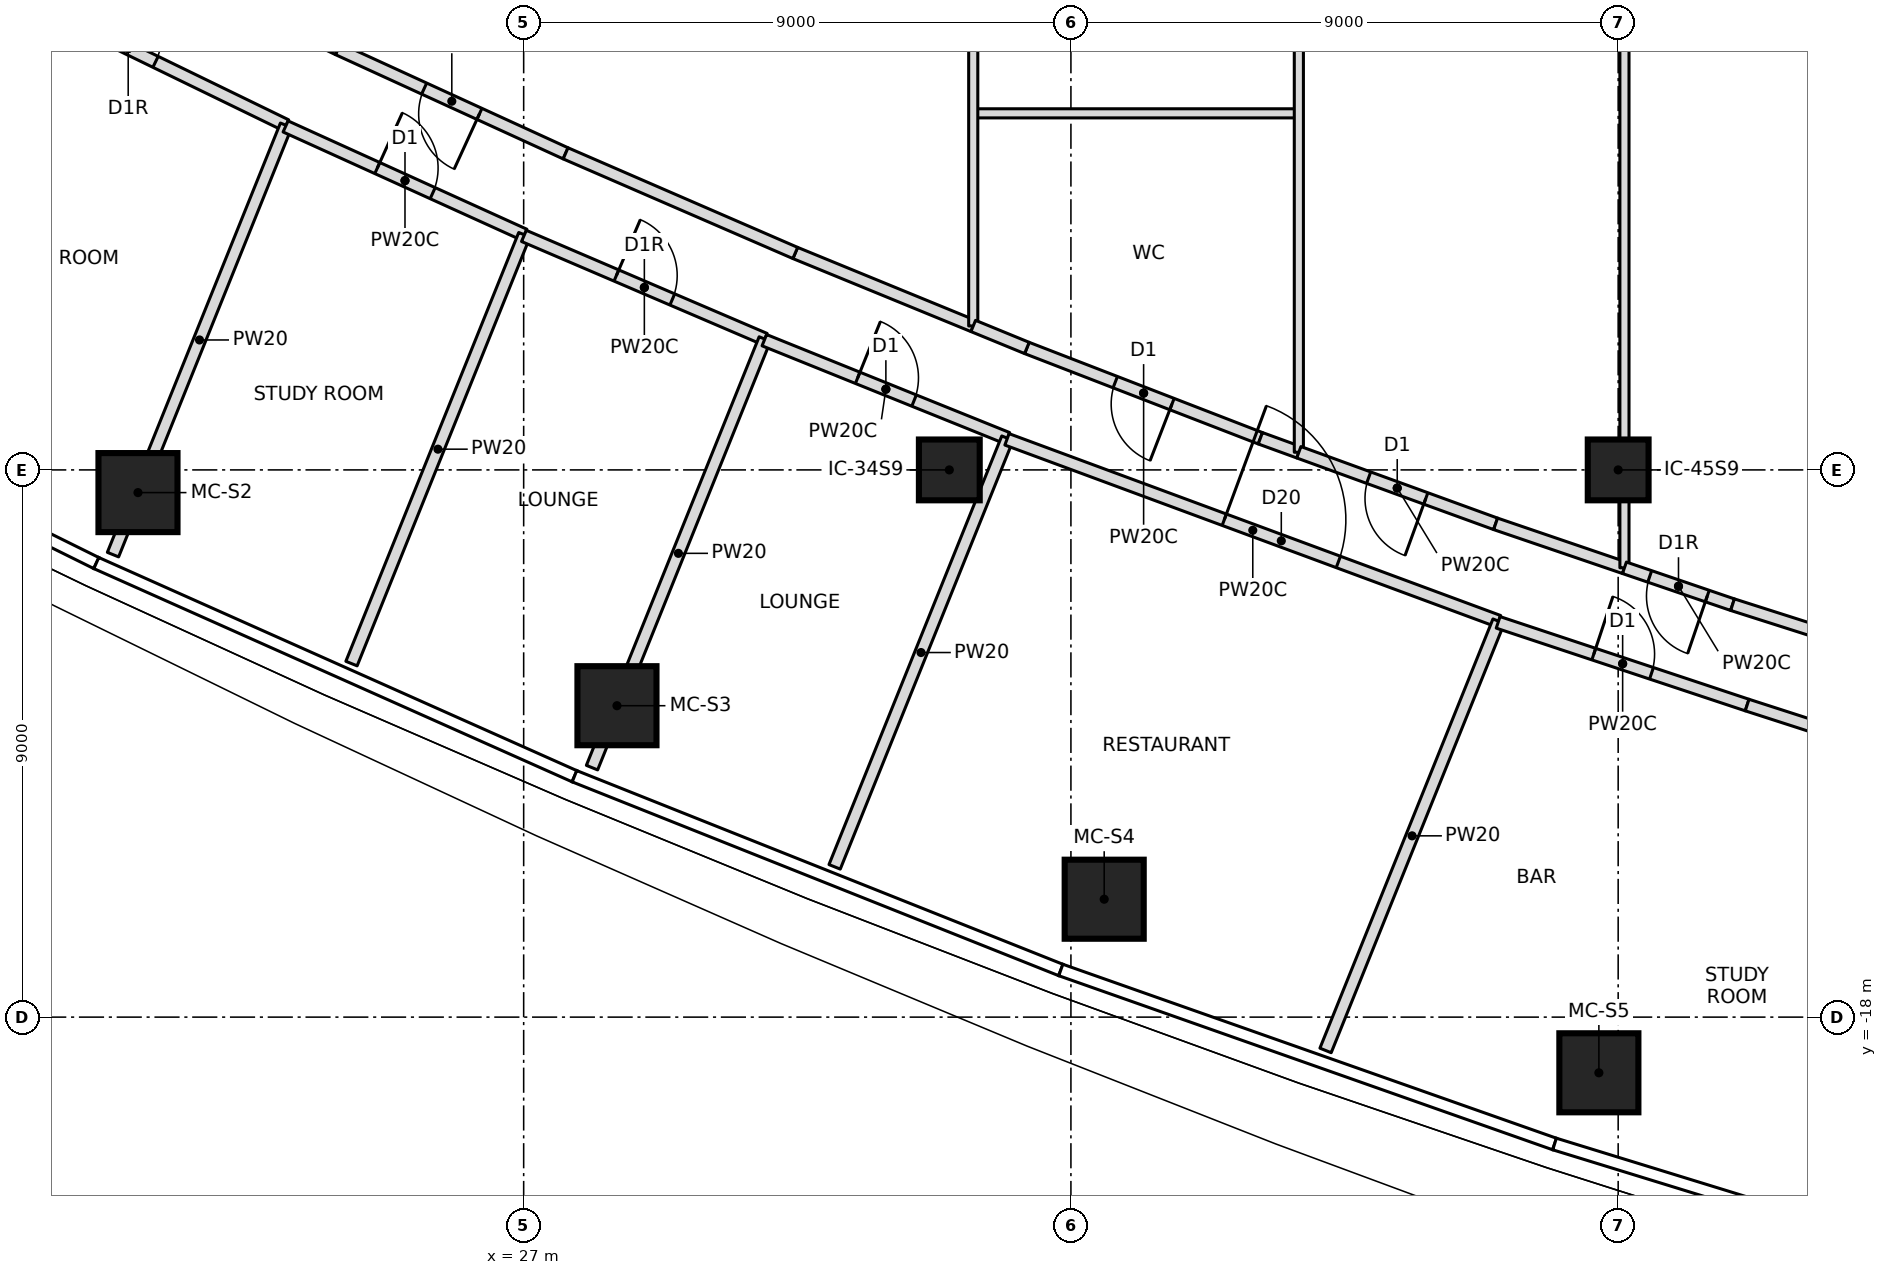
"""IFC4 building model, lengths in metres.
Left out: names, types, materials, properties, quantities, classifications, styles, units other than length and angle.
Written with IfcOpenShell. Run it as: python <this file> out.ifc"""

import sys

from ifc_helpers import new_model, si_unit, direction, frame, frame_2d, origin, origin_2d, place, context, subcontext, project, spatial, rectangle, extrude, element, fill, save


model = new_model("IFC4")
c1 = context("Model", 3, precision=1e-05, world=origin(), true_north=direction((0.0, 1.0)))
c2 = subcontext(c1, "Body", "Model", "MODEL_VIEW")
j1 = project(units=[si_unit("LENGTHUNIT", "METRE"), si_unit("PLANEANGLEUNIT", "RADIAN")], contexts=[c1])
p1 = place(None, origin())
s1 = spatial("IfcSite", under=j1, at=p1, CompositionType="ELEMENT")
p2 = place(p1, origin())
s2 = spatial("IfcBuilding", under=s1, at=p2, CompositionType="ELEMENT")
p3 = place(p2, frame((0.0, 0.0, 170.9)))
s3 = spatial("IfcBuildingStorey", under=s2, at=p3, CompositionType="ELEMENT", Elevation=170.9)
for number, where, z_axis, x_axis in (
    (1, (20.657, -9.373, 0.0), (0.0, 0.0, 1.0), (1.0, 0.0, 0.0)),
    (2, (28.534, -12.878, 0.0), (0.0, 0.0, 1.0), (1.0, 0.0, 0.0)),
    (3, (36.547, -16.061, 0.0), (0.0, 0.0, 1.0), (1.0, 0.0, 0.0)),
    (4, (44.683, -18.916, 0.0), (0.0, 0.0, 1.0), (1.0, 0.0, 0.0)),
):
    element("IfcColumn", number, at=place(p3, frame(where, z_axis=z_axis, x_axis=x_axis)), inside=s3, PredefinedType="COLUMN", context=c2, shape_type="SweptSolid", body=[
        extrude(rectangle(XDim=1.3, YDim=1.3, at=origin_2d()), origin(), (0.0, 0.0, 1.0), 4.6),
    ])
for number, where, z_axis, x_axis in (
    (5, (34.0, -9.0, 0.0), (0.0, 0.0, 1.0), (1.0, 0.0, 0.0)),
    (6, (45.0, -9.0, 0.0), (0.0, 0.0, 1.0), (1.0, 0.0, 0.0)),
):
    element("IfcColumn", number, at=place(p3, frame(where, z_axis=z_axis, x_axis=x_axis)), inside=s3, PredefinedType="COLUMN", context=c2, shape_type="SweptSolid", body=[
        extrude(rectangle(XDim=1.0, YDim=1.0, at=origin_2d()), origin(), (0.0, 0.0, 1.0), 4.6),
    ])
p4 = place(p3, frame((17.9, -0.807, 0.0), z_axis=(0.0, 0.0, 1.0), x_axis=(0.899278241665, -0.437377004503, 0.0)))
e7 = element("IfcWall", 7, at=p4, inside=s3, PredefinedType="PARTITIONING", context=c2, shape_type="SweptSolid", body=[
    extrude(rectangle(XDim=5.774, YDim=0.2, at=frame_2d((2.887, 0.0))), origin(), (0.0, 0.0, 1.0), 4.3),
])
p5 = place(p4, frame((2.387, 0.0, 0.0)))
e8 = element("IfcOpeningElement", 8, at=p5, cuts=e7, PredefinedType="OPENING", context=c2, shape_type="SweptSolid", body=[
    extrude(rectangle(XDim=1.0, YDim=2.1, at=frame_2d((0.5, 1.05))), frame((0.0, 0.11, 0.0), z_axis=(0.0, -1.0, 0.0), x_axis=(1.0, 0.0, 0.0)), (0.0, 0.0, 1.0), 0.22),
])
p6 = place(p3, frame((20.246, -10.393, 0.0), z_axis=(0.0, 0.0, 1.0), x_axis=(0.373894034942, 0.927471428473, 0.0)))
e9 = element("IfcWall", 9, at=p6, inside=s3, PredefinedType="PARTITIONING", context=c2, shape_type="SweptSolid", body=[
    extrude(rectangle(XDim=7.613, YDim=0.2, at=frame_2d((3.807, 0.0))), origin(), (0.0, 0.0, 1.0), 4.3),
])
p7 = place(p3, frame((23.085, -3.351, 0.0), z_axis=(0.0, 0.0, 1.0), x_axis=(0.910651275081, -0.413175816322, 0.0)))
e10 = element("IfcWall", 10, at=p7, inside=s3, PredefinedType="PARTITIONING", context=c2, shape_type="SweptSolid", body=[
    extrude(rectangle(XDim=4.312, YDim=0.2, at=frame_2d((2.156, 0.0))), origin(), (0.0, 0.0, 1.0), 4.3),
])
p8 = place(p7, frame((1.656, 0.0, 0.0)))
e11 = element("IfcOpeningElement", 11, at=p8, cuts=e10, PredefinedType="OPENING", context=c2, shape_type="SweptSolid", body=[
    extrude(rectangle(XDim=1.0, YDim=2.1, at=frame_2d((0.5, 1.05))), frame((0.0, 0.11, 0.0), z_axis=(0.0, -1.0, 0.0), x_axis=(1.0, 0.0, 0.0)), (0.0, 0.0, 1.0), 0.22),
])
p9 = place(p3, frame((24.168, -12.185, 0.0), z_axis=(0.0, 0.0, 1.0), x_axis=(0.373913547423, 0.927463562116, 0.0)))
e12 = element("IfcWall", 12, at=p9, inside=s3, PredefinedType="PARTITIONING", context=c2, shape_type="SweptSolid", body=[
    extrude(rectangle(XDim=7.604, YDim=0.2, at=frame_2d((3.802, 0.0))), origin(), (0.0, 0.0, 1.0), 4.3),
])
p10 = place(p3, frame((27.004, -5.151, 0.0), z_axis=(0.0, 0.0, 1.0), x_axis=(0.919259282109, -0.393652603519, 0.0)))
e13 = element("IfcWall", 13, at=p10, inside=s3, PredefinedType="PARTITIONING", context=c2, shape_type="SweptSolid", body=[
    extrude(rectangle(XDim=4.309, YDim=0.2, at=frame_2d((2.155, 0.0))), origin(), (0.0, 0.0, 1.0), 4.3),
])
p11 = place(p10, frame((1.655, 0.0, 0.0)))
e14 = element("IfcOpeningElement", 14, at=p11, cuts=e13, PredefinedType="OPENING", context=c2, shape_type="SweptSolid", body=[
    extrude(rectangle(XDim=1.0, YDim=2.1, at=frame_2d((0.5, 1.05))), frame((0.0, 0.11, 0.0), z_axis=(0.0, -1.0, 0.0), x_axis=(1.0, 0.0, 0.0)), (0.0, 0.0, 1.0), 0.22),
])
p12 = place(p3, frame((28.124, -13.897, 0.0), z_axis=(0.0, 0.0, 1.0), x_axis=(0.373876084216, 0.927478664796, 0.0)))
e15 = element("IfcWall", 15, at=p12, inside=s3, PredefinedType="PARTITIONING", context=c2, shape_type="SweptSolid", body=[
    extrude(rectangle(XDim=7.6, YDim=0.2, at=frame_2d((3.8, 0.0))), origin(), (0.0, 0.0, 1.0), 4.3),
])
p13 = place(p3, frame((30.958, -6.866, 0.0), z_axis=(0.0, 0.0, 1.0), x_axis=(0.927398695046, -0.374074404933, 0.0)))
e16 = element("IfcWall", 16, at=p13, inside=s3, PredefinedType="PARTITIONING", context=c2, shape_type="SweptSolid", body=[
    extrude(rectangle(XDim=4.311, YDim=0.2, at=frame_2d((2.155, 0.0))), origin(), (0.0, 0.0, 1.0), 4.3),
])
p14 = place(p13, frame((1.656, 0.0, 0.0)))
e17 = element("IfcOpeningElement", 17, at=p14, cuts=e16, PredefinedType="OPENING", context=c2, shape_type="SweptSolid", body=[
    extrude(rectangle(XDim=1.0, YDim=2.1, at=frame_2d((0.5, 1.05))), frame((0.0, 0.11, 0.0), z_axis=(0.0, -1.0, 0.0), x_axis=(1.0, 0.0, 0.0)), (0.0, 0.0, 1.0), 0.22),
])
p15 = place(p3, frame((32.114, -15.528, 0.0), z_axis=(0.0, 0.0, 1.0), x_axis=(0.373881438439, 0.927476506436, 0.0)))
e18 = element("IfcWall", 18, at=p15, inside=s3, PredefinedType="PARTITIONING", context=c2, shape_type="SweptSolid", body=[
    extrude(rectangle(XDim=7.601, YDim=0.2, at=frame_2d((3.8, 0.0))), origin(), (0.0, 0.0, 1.0), 4.3),
])
p16 = place(p3, frame((34.948, -8.497, 0.0), z_axis=(0.0, 0.0, 1.0), x_axis=(0.937864515454, -0.347001657996, 0.0)))
e19 = element("IfcWall", 19, at=p16, inside=s3, PredefinedType="PARTITIONING", context=c2, shape_type="SweptSolid", body=[
    extrude(rectangle(XDim=8.621, YDim=0.2, at=frame_2d((4.311, 0.0))), origin(), (0.0, 0.0, 1.0), 4.3),
])
p17 = place(p16, frame((3.81, 0.0, 0.0)))
e20 = element("IfcOpeningElement", 20, at=p17, cuts=e19, PredefinedType="OPENING", context=c2, shape_type="SweptSolid", body=[
    extrude(rectangle(XDim=2.0, YDim=2.4, at=frame_2d((1.0, 1.2))), frame((0.0, 0.11, 0.0), z_axis=(0.0, -1.0, 0.0), x_axis=(1.0, 0.0, 0.0)), (0.0, 0.0, 1.0), 0.22),
])
p18 = place(p3, frame((40.188, -18.548, 0.0), z_axis=(0.0, 0.0, 1.0), x_axis=(0.373877998371, 0.927477893178, 0.0)))
e21 = element("IfcWall", 21, at=p18, inside=s3, PredefinedType="PARTITIONING", context=c2, shape_type="SweptSolid", body=[
    extrude(rectangle(XDim=7.611, YDim=0.2, at=frame_2d((3.806, 0.0))), origin(), (0.0, 0.0, 1.0), 4.3),
])
p19 = place(p3, frame((43.026, -11.507, 0.0), z_axis=(0.0, 0.0, 1.0), x_axis=(0.949022233489, -0.315209137469, 0.0)))
e22 = element("IfcWall", 22, at=p19, inside=s3, PredefinedType="PARTITIONING", context=c2, shape_type="SweptSolid", body=[
    extrude(rectangle(XDim=4.315, YDim=0.2, at=frame_2d((2.157, 0.0))), origin(), (0.0, 0.0, 1.0), 4.3),
])
p20 = place(p19, frame((1.657, 0.0, 0.0)))
e23 = element("IfcOpeningElement", 23, at=p20, cuts=e22, PredefinedType="OPENING", context=c2, shape_type="SweptSolid", body=[
    extrude(rectangle(XDim=1.0, YDim=2.1, at=frame_2d((0.5, 1.05))), frame((0.0, 0.11, 0.0), z_axis=(0.0, -1.0, 0.0), x_axis=(1.0, 0.0, 0.0)), (0.0, 0.0, 1.0), 0.22),
])
p21 = place(p3, frame((27.69, -3.793, 0.0), z_axis=(0.0, 0.0, 1.0), x_axis=(-0.909180834404, 0.416401501382, 0.0)))
e24 = element("IfcWall", 24, at=p21, inside=s3, PredefinedType="PARTITIONING", context=c2, shape_type="SweptSolid", body=[
    extrude(rectangle(XDim=4.117, YDim=0.2, at=frame_2d((2.059, 0.0))), origin(), (0.0, 0.0, 1.0), 4.3),
])
p22 = place(p21, frame((1.559, 0.0, 0.0)))
e25 = element("IfcOpeningElement", 25, at=p22, cuts=e24, PredefinedType="OPENING", context=c2, shape_type="SweptSolid", body=[
    extrude(rectangle(XDim=1.0, YDim=2.1, at=frame_2d((0.5, 1.05))), frame((0.0, 0.11, 0.0), z_axis=(0.0, -1.0, 0.0), x_axis=(1.0, 0.0, 0.0)), (0.0, 0.0, 1.0), 0.22),
])
p23 = place(p3, frame((34.394, -6.633, 0.0), z_axis=(0.0, 0.0, 1.0), x_axis=(-0.92521099839, 0.379453038542, 0.0)))
e26 = element("IfcWall", 26, at=p23, inside=s3, PredefinedType="PARTITIONING", context=c2, shape_type="SweptSolid", body=[
    extrude(rectangle(XDim=3.164, YDim=0.2, at=frame_2d((1.582, 0.0))), origin(), (0.0, 0.0, 1.0), 4.3),
])
for number, where, z_axis, x_axis in (
    (27, (31.467, -5.432, 0.0), (0.0, 0.0, 1.0), (-0.917, 0.398, 0.0)),
    (28, (23.947, -2.079, 0.0), (0.0, 0.0, 1.0), (-0.901, 0.435, 0.0)),
):
    element("IfcWall", number, at=place(p3, frame(where, z_axis=z_axis, x_axis=x_axis)), inside=s3, PredefinedType="PARTITIONING", context=c2, shape_type="SweptSolid", body=[
        extrude(rectangle(XDim=4.117, YDim=0.2, at=frame_2d((2.059, 0.0))), origin(), (0.0, 0.0, 1.0), 4.3),
    ])
p24 = place(p3, frame((34.394, -3.135, 0.0), z_axis=(0.0, 0.0, 1.0), x_axis=(1.0, 0.0, 0.0)))
e29 = element("IfcWall", 29, at=p24, inside=s3, PredefinedType="PARTITIONING", context=c2, shape_type="SweptSolid", body=[
    extrude(rectangle(XDim=5.355, YDim=0.15, at=frame_2d((2.677, 0.0))), origin(), (0.0, 0.0, 1.0), 4.3),
])
p25 = place(p3, frame((34.394, -6.633, 0.0), z_axis=(0.0, 0.0, 1.0), x_axis=(0.0, 1.0, 0.0)))
e30 = element("IfcWall", 30, at=p25, inside=s3, PredefinedType="PARTITIONING", context=c2, shape_type="SweptSolid", body=[
    extrude(rectangle(XDim=13.265, YDim=0.15, at=frame_2d((6.633, 0.0))), origin(), (0.0, 0.0, 1.0), 4.3),
])
p26 = place(p3, frame((39.115, -8.479, 0.0), z_axis=(0.0, 0.0, 1.0), x_axis=(-0.932673028194, 0.360722916487, 0.0)))
e31 = element("IfcWall", 31, at=p26, inside=s3, PredefinedType="PARTITIONING", context=c2, shape_type="SweptSolid", body=[
    extrude(rectangle(XDim=4.117, YDim=0.2, at=frame_2d((2.059, 0.0))), origin(), (0.0, 0.0, 1.0), 4.3),
])
p27 = place(p26, frame((1.559, 0.0, 0.0)))
e32 = element("IfcOpeningElement", 32, at=p27, cuts=e31, PredefinedType="OPENING", context=c2, shape_type="SweptSolid", body=[
    extrude(rectangle(XDim=1.0, YDim=2.1, at=frame_2d((0.5, 1.05))), frame((0.0, 0.11, 0.0), z_axis=(0.0, -1.0, 0.0), x_axis=(1.0, 0.0, 0.0)), (0.0, 0.0, 1.0), 0.22),
])
p28 = place(p3, frame((39.748, -8.71, 0.0), z_axis=(0.0, 0.0, 1.0), x_axis=(-0.939740484597, 0.341888609944, 0.0)))
e33 = element("IfcWall", 33, at=p28, inside=s3, PredefinedType="PARTITIONING", context=c2, shape_type="SweptSolid", body=[
    extrude(rectangle(XDim=0.673, YDim=0.2, at=frame_2d((0.337, 0.0))), origin(), (0.0, 0.0, 1.0), 4.3),
])
p29 = place(p3, frame((35.276, -6.994, 0.0), z_axis=(0.0, 0.0, 1.0), x_axis=(-0.925191673323, 0.379500154958, 0.0)))
e34 = element("IfcWall", 34, at=p29, inside=s3, PredefinedType="PARTITIONING", context=c2, shape_type="SweptSolid", body=[
    extrude(rectangle(XDim=0.953, YDim=0.2, at=frame_2d((0.477, 0.0))), origin(), (0.0, 0.0, 1.0), 4.3),
])
p30 = place(p3, frame((39.748, -8.71, 0.0), z_axis=(0.0, 0.0, 1.0), x_axis=(0.0, 1.0, 0.0)))
e35 = element("IfcWall", 35, at=p30, inside=s3, PredefinedType="PARTITIONING", context=c2, shape_type="SweptSolid", body=[
    extrude(rectangle(XDim=17.419, YDim=0.15, at=frame_2d((8.71, 0.0))), origin(), (0.0, 0.0, 1.0), 4.3),
])
p31 = place(p3, frame((42.984, -9.887, 0.0), z_axis=(0.0, 0.0, 1.0), x_axis=(-0.93972509626, 0.341930904509, 0.0)))
e36 = element("IfcWall", 36, at=p31, inside=s3, PredefinedType="PARTITIONING", context=c2, shape_type="SweptSolid", body=[
    extrude(rectangle(XDim=3.444, YDim=0.2, at=frame_2d((1.722, 0.0))), origin(), (0.0, 0.0, 1.0), 4.3),
])
p32 = place(p31, frame((1.222, 0.0, 0.0)))
e37 = element("IfcOpeningElement", 37, at=p32, cuts=e36, PredefinedType="OPENING", context=c2, shape_type="SweptSolid", body=[
    extrude(rectangle(XDim=1.0, YDim=2.1, at=frame_2d((0.5, 1.05))), frame((0.0, 0.11, 0.0), z_axis=(0.0, -1.0, 0.0), x_axis=(1.0, 0.0, 0.0)), (0.0, 0.0, 1.0), 0.22),
])
p33 = place(p3, frame((45.103, -10.61, 0.0), z_axis=(0.0, 0.0, 1.0), x_axis=(-0.946435226242, 0.322893732562, 0.0)))
e38 = element("IfcWall", 38, at=p33, inside=s3, PredefinedType="PARTITIONING", context=c2, shape_type="SweptSolid", body=[
    extrude(rectangle(XDim=2.239, YDim=0.2, at=frame_2d((1.119, 0.0))), origin(), (0.0, 0.0, 1.0), 4.3),
])
p34 = place(p3, frame((45.103, -10.61, 0.0), z_axis=(0.0, 0.0, 1.0), x_axis=(0.0, 1.0, 0.0)))
e39 = element("IfcWall", 39, at=p34, inside=s3, PredefinedType="PARTITIONING", context=c2, shape_type="SweptSolid", body=[
    extrude(rectangle(XDim=21.22, YDim=0.15, at=frame_2d((10.61, 0.0))), origin(), (0.0, 0.0, 1.0), 4.3),
])
p35 = place(p3, frame((46.881, -11.217, 0.0), z_axis=(0.0, 0.0, 1.0), x_axis=(-0.946437079914, 0.322888299204, 0.0)))
e40 = element("IfcWall", 40, at=p35, inside=s3, PredefinedType="PARTITIONING", context=c2, shape_type="SweptSolid", body=[
    extrude(rectangle(XDim=1.878, YDim=0.2, at=frame_2d((0.939, 0.0))), origin(), (0.0, 0.0, 1.0), 4.3),
])
p36 = place(p35, frame((0.439, 0.0, 0.0)))
e41 = element("IfcOpeningElement", 41, at=p36, cuts=e40, PredefinedType="OPENING", context=c2, shape_type="SweptSolid", body=[
    extrude(rectangle(XDim=1.0, YDim=2.1, at=frame_2d((0.5, 1.05))), frame((0.0, 0.11, 0.0), z_axis=(0.0, -1.0, 0.0), x_axis=(1.0, 0.0, 0.0)), (0.0, 0.0, 1.0), 0.22),
])
p37 = place(p3, frame((48.15, -11.621, 0.0), z_axis=(0.0, 0.0, 1.0), x_axis=(-0.952761948983, 0.303718074157, 0.0)))
e42 = element("IfcWall", 42, at=p37, inside=s3, PredefinedType="PARTITIONING", context=c2, shape_type="SweptSolid", body=[
    extrude(rectangle(XDim=1.332, YDim=0.2, at=frame_2d((0.666, 0.0))), origin(), (0.0, 0.0, 1.0), 4.3),
])
p38 = place(p3, frame((47.121, -12.867, 0.0), z_axis=(0.0, 0.0, 1.0), x_axis=(0.951640795778, -0.307212948637, 0.0)))
e43 = element("IfcWall", 43, at=p38, inside=s3, PredefinedType="PARTITIONING", context=c2, shape_type="SweptSolid", body=[
    extrude(rectangle(XDim=1.392, YDim=0.2, at=frame_2d((0.696, 0.0))), origin(), (0.0, 0.0, 1.0), 4.3),
])
p39 = place(p5, origin())
e44 = element("IfcDoor", 44, at=p39, inside=s3, OperationType="SINGLE_SWING_RIGHT", PredefinedType="DOOR", context=c2, shape_type="SweptSolid", body=[
    extrude(rectangle(XDim=1.0, YDim=2.1, at=frame_2d((0.5, 1.05))), frame((0.0, 0.025, 0.0), z_axis=(0.0, -1.0, 0.0), x_axis=(1.0, 0.0, 0.0)), (0.0, 0.0, 1.0), 0.05),
])
fill(e8, e44)
p40 = place(p8, origin())
e45 = element("IfcDoor", 45, at=p40, inside=s3, OperationType="SINGLE_SWING_LEFT", PredefinedType="DOOR", context=c2, shape_type="SweptSolid", body=[
    extrude(rectangle(XDim=1.0, YDim=2.1, at=frame_2d((0.5, 1.05))), frame((0.0, 0.025, 0.0), z_axis=(0.0, -1.0, 0.0), x_axis=(1.0, 0.0, 0.0)), (0.0, 0.0, 1.0), 0.05),
])
fill(e11, e45)
p41 = place(p11, origin())
e46 = element("IfcDoor", 46, at=p41, inside=s3, OperationType="SINGLE_SWING_RIGHT", PredefinedType="DOOR", context=c2, shape_type="SweptSolid", body=[
    extrude(rectangle(XDim=1.0, YDim=2.1, at=frame_2d((0.5, 1.05))), frame((0.0, 0.025, 0.0), z_axis=(0.0, -1.0, 0.0), x_axis=(1.0, 0.0, 0.0)), (0.0, 0.0, 1.0), 0.05),
])
fill(e14, e46)
p42 = place(p14, origin())
e47 = element("IfcDoor", 47, at=p42, inside=s3, OperationType="SINGLE_SWING_LEFT", PredefinedType="DOOR", context=c2, shape_type="SweptSolid", body=[
    extrude(rectangle(XDim=1.0, YDim=2.1, at=frame_2d((0.5, 1.05))), frame((0.0, 0.025, 0.0), z_axis=(0.0, -1.0, 0.0), x_axis=(1.0, 0.0, 0.0)), (0.0, 0.0, 1.0), 0.05),
])
fill(e17, e47)
p43 = place(p17, origin())
e48 = element("IfcDoor", 48, at=p43, inside=s3, OperationType="DOUBLE_DOOR_SINGLE_SWING", PredefinedType="DOOR", context=c2, shape_type="SweptSolid", body=[
    extrude(rectangle(XDim=2.0, YDim=2.4, at=frame_2d((1.0, 1.2))), frame((0.0, 0.025, 0.0), z_axis=(0.0, -1.0, 0.0), x_axis=(1.0, 0.0, 0.0)), (0.0, 0.0, 1.0), 0.05),
])
fill(e20, e48)
p44 = place(p20, origin())
e49 = element("IfcDoor", 49, at=p44, inside=s3, OperationType="SINGLE_SWING_LEFT", PredefinedType="DOOR", context=c2, shape_type="SweptSolid", body=[
    extrude(rectangle(XDim=1.0, YDim=2.1, at=frame_2d((0.5, 1.05))), frame((0.0, 0.025, 0.0), z_axis=(0.0, -1.0, 0.0), x_axis=(1.0, 0.0, 0.0)), (0.0, 0.0, 1.0), 0.05),
])
fill(e23, e49)
p45 = place(p22, origin())
e50 = element("IfcDoor", 50, at=p45, inside=s3, OperationType="SINGLE_SWING_RIGHT", PredefinedType="DOOR", context=c2, shape_type="SweptSolid", body=[
    extrude(rectangle(XDim=1.0, YDim=2.1, at=frame_2d((0.5, 1.05))), frame((0.0, 0.025, 0.0), z_axis=(0.0, -1.0, 0.0), x_axis=(1.0, 0.0, 0.0)), (0.0, 0.0, 1.0), 0.05),
])
fill(e25, e50)
p46 = place(p27, origin())
e51 = element("IfcDoor", 51, at=p46, inside=s3, OperationType="SINGLE_SWING_LEFT", PredefinedType="DOOR", context=c2, shape_type="SweptSolid", body=[
    extrude(rectangle(XDim=1.0, YDim=2.1, at=frame_2d((0.5, 1.05))), frame((0.0, 0.025, 0.0), z_axis=(0.0, -1.0, 0.0), x_axis=(1.0, 0.0, 0.0)), (0.0, 0.0, 1.0), 0.05),
])
fill(e32, e51)
p47 = place(p32, origin())
e52 = element("IfcDoor", 52, at=p47, inside=s3, OperationType="SINGLE_SWING_LEFT", PredefinedType="DOOR", context=c2, shape_type="SweptSolid", body=[
    extrude(rectangle(XDim=1.0, YDim=2.1, at=frame_2d((0.5, 1.05))), frame((0.0, 0.025, 0.0), z_axis=(0.0, -1.0, 0.0), x_axis=(1.0, 0.0, 0.0)), (0.0, 0.0, 1.0), 0.05),
])
fill(e37, e52)
p48 = place(p36, origin())
e53 = element("IfcDoor", 53, at=p48, inside=s3, OperationType="SINGLE_SWING_RIGHT", PredefinedType="DOOR", context=c2, shape_type="SweptSolid", body=[
    extrude(rectangle(XDim=1.0, YDim=2.1, at=frame_2d((0.5, 1.05))), frame((0.0, 0.025, 0.0), z_axis=(0.0, -1.0, 0.0), x_axis=(1.0, 0.0, 0.0)), (0.0, 0.0, 1.0), 0.05),
])
fill(e41, e53)
save(model, sys.argv[1])
